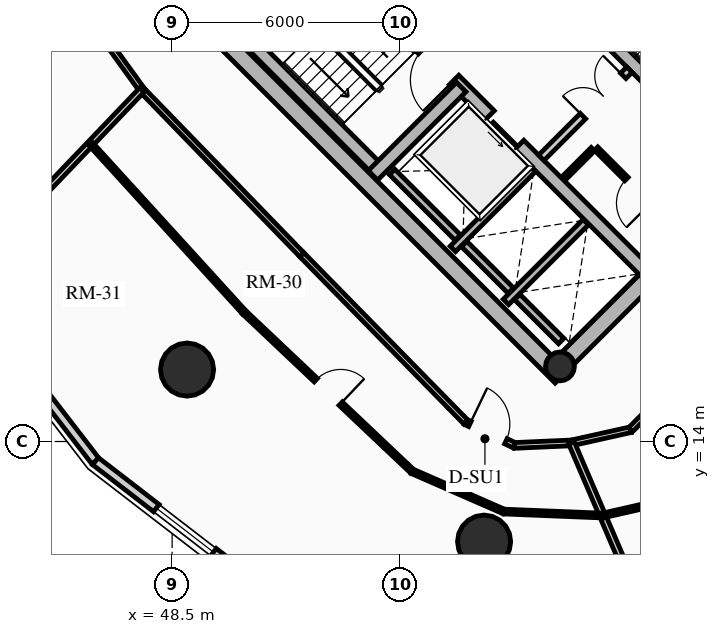
"""IFC4 building model, lengths in metres.
Left out: names, types, materials, properties, quantities, classifications, styles, units other than length and angle.
Written with IfcOpenShell. Run it as: python <this file> out.ifc"""

import sys

from ifc_helpers import new_model, si_unit, direction, frame, frame_2d, origin, origin_2d, place, context, subcontext, project, spatial, rectangle, circle, hollow_circle, extrude, source, transform, mapped, element, fill, save


model = new_model("IFC4")
c1 = context("Model", 3, precision=1e-05, world=origin(), true_north=direction((0.0, 1.0)))
c2 = subcontext(c1, "Body", "Model", "MODEL_VIEW")
j1 = project(units=[si_unit("LENGTHUNIT", "METRE"), si_unit("PLANEANGLEUNIT", "RADIAN")], contexts=[c1])
p1 = place(None, origin())
s1 = spatial("IfcSite", under=j1, at=p1, CompositionType="ELEMENT")
p2 = place(p1, origin())
s2 = spatial("IfcBuilding", under=s1, at=p2, CompositionType="ELEMENT")
p3 = place(p2, frame((0.0, 0.0, 105.07)))
s3 = spatial("IfcBuildingStorey", under=s2, at=p3, CompositionType="ELEMENT", Elevation=105.07)
for number, where, z_axis, x_axis in (
    (1, (58.737, 15.697, 0.0), (0.0, 0.0, 1.0), (-0.707, 0.707, 0.0)),
    (2, (66.303, 23.263, 0.0), (0.0, 0.0, 1.0), (-0.707, 0.707, 0.0)),
):
    element("IfcWall", number, at=place(p3, frame(where, z_axis=z_axis, x_axis=x_axis)), inside=s3, PredefinedType="SHEAR", context=c2, shape_type="SweptSolid", body=[
        extrude(rectangle(XDim=14.2, YDim=0.45, at=frame_2d((7.1, 0.0))), origin(), (0.0, 0.0, 1.0), 2.91),
    ])
p4 = place(p3, frame((58.578, 15.856, 0.0), z_axis=(0.0, 0.0, 1.0), x_axis=(0.707106781187, 0.707106781187, 0.0)))
e3 = element("IfcWall", 3, at=p4, inside=s3, PredefinedType="SHEAR", context=c2, shape_type="SweptSolid", body=[
    extrude(rectangle(XDim=10.7, YDim=0.45, at=frame_2d((5.35, 0.0))), origin(), (0.0, 0.0, 1.0), 2.91),
])
m1 = source(origin(), c2, "Body", "SweptSolid", [
    extrude(rectangle(XDim=1.5, YDim=2.02, at=frame_2d((0.75, 1.01))), frame((0.0, 0.235, 0.0), z_axis=(0.0, -1.0, 0.0), x_axis=(1.0, 0.0, 0.0)), (0.0, 0.0, 1.0), 0.47),
])
p5 = place(p4, frame((5.45, 0.0, 0.0)))
e4 = element("IfcOpeningElement", 4, at=p5, cuts=e3, PredefinedType="OPENING", context=c2, shape_type="MappedRepresentation", body=[
    mapped(m1, transform((0.0, 0.0, 0.0), x_axis=(1.0, 0.0, 0.0), y_axis=(0.0, 1.0, 0.0), z_axis=(0.0, 0.0, 1.0), scale=1.0)),
])
p6 = place(p3, frame((61.078, 18.355, 0.0), z_axis=(0.0, 0.0, 1.0), x_axis=(-0.707106781187, 0.707106781187, 0.0)))
e5 = element("IfcWall", 5, at=p6, inside=s3, PredefinedType="SHEAR", context=c2, shape_type="SweptSolid", body=[
    extrude(rectangle(XDim=13.75, YDim=0.35, at=frame_2d((6.875, 0.0))), origin(), (0.0, 0.0, 1.0), 2.91),
])
m2 = source(origin(), c2, "Body", "SweptSolid", [
    extrude(rectangle(XDim=1.1, YDim=2.015, at=frame_2d((0.55, 1.007))), frame((0.0, 0.185, 0.0), z_axis=(0.0, -1.0, 0.0), x_axis=(1.0, 0.0, 0.0)), (0.0, 0.0, 1.0), 0.37),
])
p7 = place(p6, frame((4.875, 0.0, 0.0)))
e6 = element("IfcOpeningElement", 6, at=p7, cuts=e5, PredefinedType="OPENING", context=c2, shape_type="MappedRepresentation", body=[
    mapped(m2, transform((0.0, 0.0, 0.0), x_axis=(1.0, 0.0, 0.0), y_axis=(0.0, 1.0, 0.0), z_axis=(0.0, 0.0, 1.0), scale=1.0)),
])
m3 = source(origin(), c2, "Body", "SweptSolid", [
    extrude(rectangle(XDim=1.15, YDim=2.02, at=frame_2d((0.575, 1.01))), frame((0.0, 0.185, 0.0), z_axis=(0.0, -1.0, 0.0), x_axis=(1.0, 0.0, 0.0)), (0.0, 0.0, 1.0), 0.37),
])
p8 = place(p6, frame((7.295, 0.0, 0.0)))
e7 = element("IfcOpeningElement", 7, at=p8, cuts=e5, PredefinedType="OPENING", context=c2, shape_type="MappedRepresentation", body=[
    mapped(m3, transform((0.0, 0.0, 0.0), x_axis=(1.0, 0.0, 0.0), y_axis=(0.0, 1.0, 0.0), z_axis=(0.0, 0.0, 1.0), scale=1.0)),
])
p9 = place(p3, frame((63.645, 20.922, 0.0), z_axis=(0.0, 0.0, 1.0), x_axis=(-0.707106781187, 0.707106781187, 0.0)))
e8 = element("IfcWall", 8, at=p9, inside=s3, PredefinedType="SHEAR", context=c2, shape_type="SweptSolid", body=[
    extrude(rectangle(XDim=13.75, YDim=0.35, at=frame_2d((6.875, 0.0))), origin(), (0.0, 0.0, 1.0), 2.91),
])
p10 = place(p9, frame((10.0, 0.0, 0.0)))
e9 = element("IfcOpeningElement", 9, at=p10, cuts=e8, PredefinedType="OPENING", context=c2, shape_type="MappedRepresentation", body=[
    mapped(m2, transform((0.0, 0.0, 0.0), x_axis=(1.0, 0.0, 0.0), y_axis=(0.0, 1.0, 0.0), z_axis=(0.0, 0.0, 1.0), scale=1.0)),
])
p11 = place(p9, frame((12.0, 0.0, 0.0)))
e10 = element("IfcOpeningElement", 10, at=p11, cuts=e8, PredefinedType="OPENING", context=c2, shape_type="MappedRepresentation", body=[
    mapped(m2, transform((0.0, 0.0, 0.0), x_axis=(1.0, 0.0, 0.0), y_axis=(0.0, 1.0, 0.0), z_axis=(0.0, 0.0, 1.0), scale=1.0)),
])
p12 = place(p9, frame((5.305, 0.0, 0.0)))
e11 = element("IfcOpeningElement", 11, at=p12, cuts=e8, PredefinedType="OPENING", context=c2, shape_type="MappedRepresentation", body=[
    mapped(m3, transform((0.0, 0.0, 0.0), x_axis=(1.0, 0.0, 0.0), y_axis=(0.0, 1.0, 0.0), z_axis=(0.0, 0.0, 1.0), scale=1.0)),
])
p13 = place(p3, frame((53.922, 21.141, 0.0), z_axis=(0.0, 0.0, 1.0), x_axis=(-0.707088616009, 0.707124945897, 0.0)))
e12 = element("IfcWall", 12, at=p13, inside=s3, PredefinedType="SHEAR", context=c2, shape_type="SweptSolid", body=[
    extrude(rectangle(XDim=6.72, YDim=0.35, at=frame_2d((3.36, 0.0))), origin(), (0.0, 0.0, 1.0), 2.91),
])
p14 = place(p3, frame((53.784, 21.003, 0.0), z_axis=(0.0, 0.0, 1.0), x_axis=(0.707106781187, 0.707106781187, 0.0)))
e13 = element("IfcWall", 13, at=p14, inside=s3, PredefinedType="SHEAR", context=c2, shape_type="SweptSolid", body=[
    extrude(rectangle(XDim=3.285, YDim=0.35, at=frame_2d((1.643, 0.0))), origin(), (0.0, 0.0, 1.0), 2.91),
])
p15 = place(p3, frame((58.706, 15.976, 0.0), z_axis=(0.0, 0.0, 1.0), x_axis=(0.707106781187, 0.707106781187, 0.0)))
e14 = element("IfcColumn", 14, at=p15, inside=s3, PredefinedType="COLUMN", context=c2, shape_type="SweptSolid", body=[
    extrude(hollow_circle(Radius=0.38, WallThickness=0.032, at=origin_2d()), origin(), (0.0, 0.0, 1.0), 2.91),
])
for number, where, z_axis, x_axis in (
    (15, (48.893, 15.893, 0.0), (0.0, 0.0, 1.0), (1.0, 0.0, 0.0)),
    (16, (56.709, 11.365, 0.0), (0.0, 0.0, 1.0), (1.0, 0.0, 0.0)),
):
    element("IfcColumn", number, at=place(p3, frame(where, z_axis=z_axis, x_axis=x_axis)), inside=s3, PredefinedType="USERDEFINED", context=c2, shape_type="SweptSolid", body=[
        extrude(circle(Radius=0.7, at=origin_2d()), origin(), (0.0, 0.0, 1.0), 2.91),
    ])
p16 = place(p3, frame((46.483, 13.483, 0.0), z_axis=(0.0, 0.0, 1.0), x_axis=(-0.61054437102, 0.791982052206, 0.0)))
e17 = element("IfcWall", 17, at=p16, inside=s3, PredefinedType="SOLIDWALL", context=c2, shape_type="SweptSolid", body=[
    extrude(rectangle(XDim=5.942, YDim=0.24, at=frame_2d((2.971, 0.0))), origin(), (0.0, 0.0, 1.0), 2.179),
])
p17 = place(p3, frame((51.189, 9.855, 0.0), z_axis=(0.0, 0.0, 1.0), x_axis=(-0.791982052206, 0.61054437102, 0.0)))
e18 = element("IfcWall", 18, at=p17, inside=s3, PredefinedType="SOLIDWALL", context=c2, shape_type="SweptSolid", body=[
    extrude(rectangle(XDim=5.942, YDim=0.24, at=frame_2d((2.971, 0.0))), origin(), (0.0, 0.0, 1.0), 2.179),
])
m4 = source(origin(), c2, "Body", "SweptSolid", [
    extrude(rectangle(XDim=1.9, YDim=1.35, at=frame_2d((0.95, 0.675))), frame((0.0, 0.13, 0.0), z_axis=(0.0, -1.0, 0.0), x_axis=(1.0, 0.0, 0.0)), (0.0, 0.0, 1.0), 0.26),
])
p18 = place(p17, frame((2.021, 0.0, 0.65)))
e19 = element("IfcOpeningElement", 19, at=p18, cuts=e18, PredefinedType="OPENING", context=c2, shape_type="MappedRepresentation", body=[
    mapped(m4, transform((0.0, 0.0, 0.0), x_axis=(1.0, 0.0, 0.0), y_axis=(0.0, 1.0, 0.0), z_axis=(0.0, 0.0, 1.0), scale=1.0)),
])
p19 = place(p3, frame((55.888, 19.069, 0.0), z_axis=(0.0, 0.0, 1.0), x_axis=(0.707106781187, 0.707106781187, 0.0)))
e20 = element("IfcWall", 20, at=p19, inside=s3, PredefinedType="SHEAR", context=c2, shape_type="SweptSolid", body=[
    extrude(rectangle(XDim=2.97, YDim=0.2, at=frame_2d((1.485, 0.0))), origin(), (0.0, 0.0, 1.0), 2.91),
])
p20 = place(p3, frame((56.015, 19.366, 0.0), z_axis=(0.0, 0.0, 1.0), x_axis=(-0.707106781187, 0.707106781187, 0.0)))
e21 = element("IfcWall", 21, at=p20, inside=s3, PredefinedType="SHEAR", context=c2, shape_type="SweptSolid", body=[
    extrude(rectangle(XDim=2.44, YDim=0.2, at=frame_2d((1.22, 0.0))), origin(), (0.0, 0.0, 1.0), 2.91),
])
p21 = place(p3, frame((57.284, 17.673, 0.0), z_axis=(0.0, 0.0, 1.0), x_axis=(0.707147878904, 0.70706568108, 0.0)))
e22 = element("IfcWall", 22, at=p21, inside=s3, PredefinedType="SHEAR", context=c2, shape_type="SweptSolid", body=[
    extrude(rectangle(XDim=2.97, YDim=0.2, at=frame_2d((1.485, 0.0))), origin(), (0.0, 0.0, 1.0), 2.91),
])
p22 = place(p3, frame((57.412, 17.97, 0.0), z_axis=(0.0, 0.0, 1.0), x_axis=(-0.707106781187, 0.707106781187, 0.0)))
e23 = element("IfcWall", 23, at=p22, inside=s3, PredefinedType="SHEAR", context=c2, shape_type="SweptSolid", body=[
    extrude(rectangle(XDim=1.735, YDim=0.2, at=frame_2d((0.867, 0.0))), origin(), (0.0, 0.0, 1.0), 2.91),
])
p23 = place(p3, frame((58.737, 16.644, 0.0), z_axis=(0.0, 0.0, 1.0), x_axis=(-0.707032117043, 0.707181437447, 0.0)))
e24 = element("IfcWall", 24, at=p23, inside=s3, PredefinedType="SHEAR", context=c2, shape_type="SweptSolid", body=[
    extrude(rectangle(XDim=1.635, YDim=0.2, at=frame_2d((0.817, 0.0))), origin(), (0.0, 0.0, 1.0), 2.91),
])
p24 = place(p3, frame((58.214, 21.467, 0.0), z_axis=(0.0, 0.0, 1.0), x_axis=(0.707106781187, 0.707106781187, 0.0)))
e25 = element("IfcWall", 25, at=p24, inside=s3, PredefinedType="PARTITIONING", context=c2, shape_type="SweptSolid", body=[
    extrude(rectangle(XDim=3.28, YDim=0.2, at=frame_2d((1.64, 0.0))), origin(), (0.0, 0.0, 1.0), 2.655),
])
m5 = source(origin(), c2, "Body", "SweptSolid", [
    extrude(rectangle(XDim=1.5, YDim=2.02, at=frame_2d((0.75, 1.01))), frame((0.0, 0.11, 0.0), z_axis=(0.0, -1.0, 0.0), x_axis=(1.0, 0.0, 0.0)), (0.0, 0.0, 1.0), 0.22),
])
p25 = place(p24, frame((1.55, 0.0, 0.0)))
e26 = element("IfcOpeningElement", 26, at=p25, cuts=e25, PredefinedType="OPENING", context=c2, shape_type="MappedRepresentation", body=[
    mapped(m5, transform((0.0, 0.0, 0.0), x_axis=(1.0, 0.0, 0.0), y_axis=(0.0, 1.0, 0.0), z_axis=(0.0, 0.0, 1.0), scale=1.0)),
])
p26 = place(p3, frame((61.835, 19.529, 0.0), z_axis=(0.0, 0.0, 1.0), x_axis=(-0.707146413884, 0.707067146267, 0.0)))
e27 = element("IfcWall", 27, at=p26, inside=s3, PredefinedType="PARTITIONING", context=c2, shape_type="SweptSolid", body=[
    extrude(rectangle(XDim=3.08, YDim=0.125, at=frame_2d((1.54, 0.0))), origin(), (0.0, 0.0, 1.0), 2.655),
])
m6 = source(origin(), c2, "Body", "SweptSolid", [
    extrude(rectangle(XDim=0.9, YDim=2.005, at=frame_2d((0.45, 1.002))), frame((0.0, 0.073, 0.0), z_axis=(0.0, -1.0, 0.0), x_axis=(1.0, 0.0, 0.0)), (0.0, 0.0, 1.0), 0.145),
])
p27 = place(p26, frame((1.05, 0.0, 0.0)))
e28 = element("IfcOpeningElement", 28, at=p27, cuts=e27, PredefinedType="OPENING", context=c2, shape_type="MappedRepresentation", body=[
    mapped(m6, transform((0.0, 0.0, 0.0), x_axis=(1.0, 0.0, 0.0), y_axis=(0.0, 1.0, 0.0), z_axis=(0.0, 0.0, 1.0), scale=1.0)),
])
p28 = place(p3, frame((58.794, 20.915, 0.0), z_axis=(0.0, 0.0, 1.0), x_axis=(0.707106781187, 0.707106781187, 0.0)))
e29 = element("IfcWall", 29, at=p28, inside=s3, PredefinedType="PARTITIONING", context=c2, shape_type="SweptSolid", body=[
    extrude(rectangle(XDim=1.1, YDim=0.125, at=frame_2d((0.55, 0.0))), origin(), (0.0, 0.0, 1.0), 2.655),
])
p29 = place(p3, frame((46.795, 24.513, 0.0), z_axis=(0.0, 0.0, 1.0), x_axis=(0.585628197524, -0.810579801294, 0.0)))
e30 = element("IfcWall", 30, at=p29, inside=s3, PredefinedType="PARTITIONING", context=c2, shape_type="SweptSolid", body=[
    extrude(rectangle(XDim=1.554, YDim=0.15, at=frame_2d((0.777, 0.0))), origin(), (0.0, 0.0, 1.0), 2.225),
])
p30 = place(p3, frame((47.706, 23.253, 0.0), z_axis=(0.0, 0.0, 1.0), x_axis=(0.696179266346, -0.717867974707, 0.0)))
e31 = element("IfcWall", 31, at=p30, inside=s3, PredefinedType="PARTITIONING", context=c2, shape_type="SweptSolid", body=[
    extrude(rectangle(XDim=6.045, YDim=0.15, at=frame_2d((3.022, 0.0))), origin(), (0.0, 0.0, 1.0), 2.655),
])
p31 = place(p3, frame((51.914, 18.914, 0.0), z_axis=(0.0, 0.0, 1.0), x_axis=(0.699999313799, -0.714143515465, 0.0)))
e32 = element("IfcWall", 32, at=p31, inside=s3, PredefinedType="PARTITIONING", context=c2, shape_type="SweptSolid", body=[
    extrude(rectangle(XDim=6.162, YDim=0.15, at=frame_2d((3.081, 0.0))), origin(), (0.0, 0.0, 1.0), 2.225),
])
p32 = place(p3, frame((56.227, 14.513, 0.0), z_axis=(0.0, 0.0, 1.0), x_axis=(0.901477579283, -0.432825801044, 0.0)))
e33 = element("IfcWall", 33, at=p32, inside=s3, PredefinedType="PARTITIONING", context=c2, shape_type="SweptSolid", body=[
    extrude(rectangle(XDim=1.424, YDim=0.15, at=frame_2d((0.712, 0.0))), origin(), (0.0, 0.0, 1.0), 2.225),
])
m7 = source(origin(), c2, "Body", "SweptSolid", [
    extrude(rectangle(XDim=1.05, YDim=2.015, at=frame_2d((0.525, 1.007))), frame((0.0, 0.085, 0.0), z_axis=(0.0, -1.0, 0.0), x_axis=(1.0, 0.0, 0.0)), (0.0, 0.0, 1.0), 0.17),
])
p33 = place(p32, frame((0.12, 0.0, 0.0)))
e34 = element("IfcOpeningElement", 34, at=p33, cuts=e33, PredefinedType="OPENING", context=c2, shape_type="MappedRepresentation", body=[
    mapped(m7, transform((0.0, 0.0, 0.0), x_axis=(1.0, 0.0, 0.0), y_axis=(0.0, 1.0, 0.0), z_axis=(0.0, 0.0, 1.0), scale=1.0)),
])
p34 = place(p3, frame((57.511, 13.897, 0.0), z_axis=(0.0, 0.0, 1.0), x_axis=(0.999024538494, 0.044158481476, 0.0)))
e35 = element("IfcWall", 35, at=p34, inside=s3, PredefinedType="PARTITIONING", context=c2, shape_type="SweptSolid", body=[
    extrude(rectangle(XDim=1.498, YDim=0.15, at=frame_2d((0.749, 0.0))), origin(), (0.0, 0.0, 1.0), 2.225),
])
p35 = place(p3, frame((59.008, 13.963, 0.0), z_axis=(0.0, 0.0, 1.0), x_axis=(0.976020856791, 0.21767702476, 0.0)))
e36 = element("IfcWall", 36, at=p35, inside=s3, PredefinedType="PARTITIONING", context=c2, shape_type="SweptSolid", body=[
    extrude(rectangle(XDim=1.593, YDim=0.15, at=frame_2d((0.796, 0.0))), origin(), (0.0, 0.0, 1.0), 2.225),
])
p36 = place(p3, frame((60.562, 14.31, 0.0), z_axis=(0.0, 0.0, 1.0), x_axis=(0.704566236161, 0.709638230975, 0.0)))
e37 = element("IfcWall", 37, at=p36, inside=s3, PredefinedType="PARTITIONING", context=c2, shape_type="SweptSolid", body=[
    extrude(rectangle(XDim=3.321, YDim=0.15, at=frame_2d((1.661, 0.0))), origin(), (0.0, 0.0, 1.0), 2.225),
])
p37 = place(p3, frame((47.706, 23.253, 0.0), z_axis=(0.0, 0.0, 1.0), x_axis=(-0.691027649154, -0.722828325472, 0.0)))
e38 = element("IfcWall", 38, at=p37, inside=s3, PredefinedType="PARTITIONING", context=c2, shape_type="SweptSolid", body=[
    extrude(rectangle(XDim=6.994, YDim=0.16, at=frame_2d((3.497, 0.0))), origin(), (0.0, 0.0, 1.0), 2.179),
])
p38 = place(p3, frame((59.008, 13.963, 0.0), z_axis=(0.0, 0.0, 1.0), x_axis=(0.393439207333, -0.919350635032, 0.0)))
e39 = element("IfcWall", 39, at=p38, inside=s3, PredefinedType="PARTITIONING", context=c2, shape_type="SweptSolid", body=[
    extrude(rectangle(XDim=7.427, YDim=0.16, at=frame_2d((3.713, 0.0))), origin(), (0.0, 0.0, 1.0), 2.179),
])
p39 = place(p3, frame((46.352, 21.838, 0.0), z_axis=(0.0, 0.0, 1.0), x_axis=(0.673416949194, -0.739262884594, 0.0)))
e40 = element("IfcWall", 40, at=p39, inside=s3, PredefinedType="PARTITIONING", context=c2, shape_type="SweptSolid", body=[
    extrude(rectangle(XDim=6.007, YDim=0.125, at=frame_2d((3.003, 0.0))), origin(), (0.0, 0.0, 1.0), 2.655),
])
p40 = place(p3, frame((50.397, 17.397, 0.0), z_axis=(0.0, 0.0, 1.0), x_axis=(0.726427828833, -0.687242758781, 0.0)))
e41 = element("IfcWall", 41, at=p40, inside=s3, PredefinedType="PARTITIONING", context=c2, shape_type="SweptSolid", body=[
    extrude(rectangle(XDim=6.087, YDim=0.125, at=frame_2d((3.043, 0.0))), origin(), (0.0, 0.0, 1.0), 2.225),
])
p41 = place(p40, frame((2.594, 0.0, 0.0)))
e42 = element("IfcOpeningElement", 42, at=p41, cuts=e41, PredefinedType="OPENING", context=c2, shape_type="MappedRepresentation", body=[
    mapped(m6, transform((0.0, 0.0, 0.0), x_axis=(1.0, 0.0, 0.0), y_axis=(0.0, 1.0, 0.0), z_axis=(0.0, 0.0, 1.0), scale=1.0)),
])
p42 = place(p3, frame((54.819, 13.214, 0.0), z_axis=(0.0, 0.0, 1.0), x_axis=(0.915889218912, -0.401431113245, 0.0)))
e43 = element("IfcWall", 43, at=p42, inside=s3, PredefinedType="PARTITIONING", context=c2, shape_type="SweptSolid", body=[
    extrude(rectangle(XDim=2.635, YDim=0.125, at=frame_2d((1.318, 0.0))), origin(), (0.0, 0.0, 1.0), 2.225),
])
p43 = place(p3, frame((57.233, 12.156, 0.0), z_axis=(0.0, 0.0, 1.0), x_axis=(0.999181916557, -0.040441286156, 0.0)))
e44 = element("IfcWall", 44, at=p43, inside=s3, PredefinedType="PARTITIONING", context=c2, shape_type="SweptSolid", body=[
    extrude(rectangle(XDim=2.596, YDim=0.125, at=frame_2d((1.298, 0.0))), origin(), (0.0, 0.0, 1.0), 2.655),
])
p44 = place(p3, frame((59.826, 12.051, 0.0), z_axis=(0.0, 0.0, 1.0), x_axis=(0.975009915085, 0.222161350116, 0.0)))
e45 = element("IfcWall", 45, at=p44, inside=s3, PredefinedType="PARTITIONING", context=c2, shape_type="SweptSolid", body=[
    extrude(rectangle(XDim=2.578, YDim=0.125, at=frame_2d((1.289, 0.0))), origin(), (0.0, 0.0, 1.0), 2.225),
])
m8 = source(origin(), c2, "Body", "SweptSolid", [
    extrude(rectangle(XDim=1.9, YDim=1.35, at=frame_2d((0.95, 0.675))), frame((0.0, 0.03, 0.0), z_axis=(0.0, -1.0, 0.0), x_axis=(1.0, 0.0, 0.0)), (0.0, 0.0, 1.0), 0.06),
])
p45 = place(p18, origin())
e46 = element("IfcWindow", 46, at=p45, inside=s3, PartitioningType="DOUBLE_PANEL_VERTICAL", PredefinedType="WINDOW", context=c2, shape_type="MappedRepresentation", body=[
    mapped(m8, transform((0.0, 0.0, 0.0), x_axis=(1.0, 0.0, 0.0), y_axis=(0.0, 1.0, 0.0), z_axis=(0.0, 0.0, 1.0), scale=1.0)),
])
fill(e19, e46)
m9 = source(origin(), c2, "Body", "SweptSolid", [
    extrude(rectangle(XDim=1.1, YDim=2.015, at=frame_2d((0.55, 1.007))), frame((0.0, 0.025, 0.0), z_axis=(0.0, -1.0, 0.0), x_axis=(1.0, 0.0, 0.0)), (0.0, 0.0, 1.0), 0.05),
])
p46 = place(p7, origin())
e47 = element("IfcDoor", 47, at=p46, inside=s3, OperationType="SLIDING_TO_LEFT", PredefinedType="DOOR", context=c2, shape_type="MappedRepresentation", body=[
    mapped(m9, transform((0.0, 0.0, 0.0), x_axis=(1.0, 0.0, 0.0), y_axis=(0.0, 1.0, 0.0), z_axis=(0.0, 0.0, 1.0), scale=1.0)),
])
fill(e6, e47)
m10 = source(origin(), c2, "Body", "SweptSolid", [
    extrude(rectangle(XDim=1.15, YDim=2.02, at=frame_2d((0.575, 1.01))), frame((0.0, 0.025, 0.0), z_axis=(0.0, -1.0, 0.0), x_axis=(1.0, 0.0, 0.0)), (0.0, 0.0, 1.0), 0.05),
])
p47 = place(p8, origin())
e48 = element("IfcDoor", 48, at=p47, inside=s3, OperationType="SINGLE_SWING_LEFT", PredefinedType="DOOR", context=c2, shape_type="MappedRepresentation", body=[
    mapped(m10, transform((0.0, 0.0, 0.0), x_axis=(1.0, 0.0, 0.0), y_axis=(0.0, 1.0, 0.0), z_axis=(0.0, 0.0, 1.0), scale=1.0)),
])
fill(e7, e48)
m11 = source(origin(), c2, "Body", "SweptSolid", [
    extrude(rectangle(XDim=1.5, YDim=2.02, at=frame_2d((0.75, 1.01))), frame((0.0, 0.025, 0.0), z_axis=(0.0, -1.0, 0.0), x_axis=(1.0, 0.0, 0.0)), (0.0, 0.0, 1.0), 0.05),
])
p48 = place(p25, origin())
e49 = element("IfcDoor", 49, at=p48, inside=s3, OperationType="DOUBLE_DOOR_SINGLE_SWING", PredefinedType="DOOR", context=c2, shape_type="MappedRepresentation", body=[
    mapped(m11, transform((0.0, 0.0, 0.0), x_axis=(1.0, 0.0, 0.0), y_axis=(0.0, 1.0, 0.0), z_axis=(0.0, 0.0, 1.0), scale=1.0)),
])
fill(e26, e49)
m12 = source(origin(), c2, "Body", "SweptSolid", [
    extrude(rectangle(XDim=0.9, YDim=2.005, at=frame_2d((0.45, 1.002))), frame((0.0, 0.025, 0.0), z_axis=(0.0, -1.0, 0.0), x_axis=(1.0, 0.0, 0.0)), (0.0, 0.0, 1.0), 0.05),
])
p49 = place(p27, origin())
e50 = element("IfcDoor", 50, at=p49, inside=s3, OperationType="SINGLE_SWING_LEFT", PredefinedType="DOOR", context=c2, shape_type="MappedRepresentation", body=[
    mapped(m12, transform((0.0, 0.0, 0.0), x_axis=(1.0, 0.0, 0.0), y_axis=(0.0, 1.0, 0.0), z_axis=(0.0, 0.0, 1.0), scale=1.0)),
])
fill(e28, e50)
m13 = source(origin(), c2, "Body", "SweptSolid", [
    extrude(rectangle(XDim=1.05, YDim=2.015, at=frame_2d((0.525, 1.007))), frame((0.0, 0.025, 0.0), z_axis=(0.0, -1.0, 0.0), x_axis=(1.0, 0.0, 0.0)), (0.0, 0.0, 1.0), 0.05),
])
p50 = place(p33, origin())
e51 = element("IfcDoor", 51, at=p50, inside=s3, OperationType="SINGLE_SWING_LEFT", PredefinedType="DOOR", context=c2, shape_type="MappedRepresentation", body=[
    mapped(m13, transform((0.0, 0.0, 0.0), x_axis=(1.0, 0.0, 0.0), y_axis=(0.0, 1.0, 0.0), z_axis=(0.0, 0.0, 1.0), scale=1.0)),
])
fill(e34, e51)
p51 = place(p41, origin())
e52 = element("IfcDoor", 52, at=p51, inside=s3, OperationType="SINGLE_SWING_RIGHT", PredefinedType="DOOR", context=c2, shape_type="MappedRepresentation", body=[
    mapped(m12, transform((0.0, 0.0, 0.0), x_axis=(1.0, 0.0, 0.0), y_axis=(0.0, 1.0, 0.0), z_axis=(0.0, 0.0, 1.0), scale=1.0)),
])
fill(e42, e52)
save(model, sys.argv[1])
